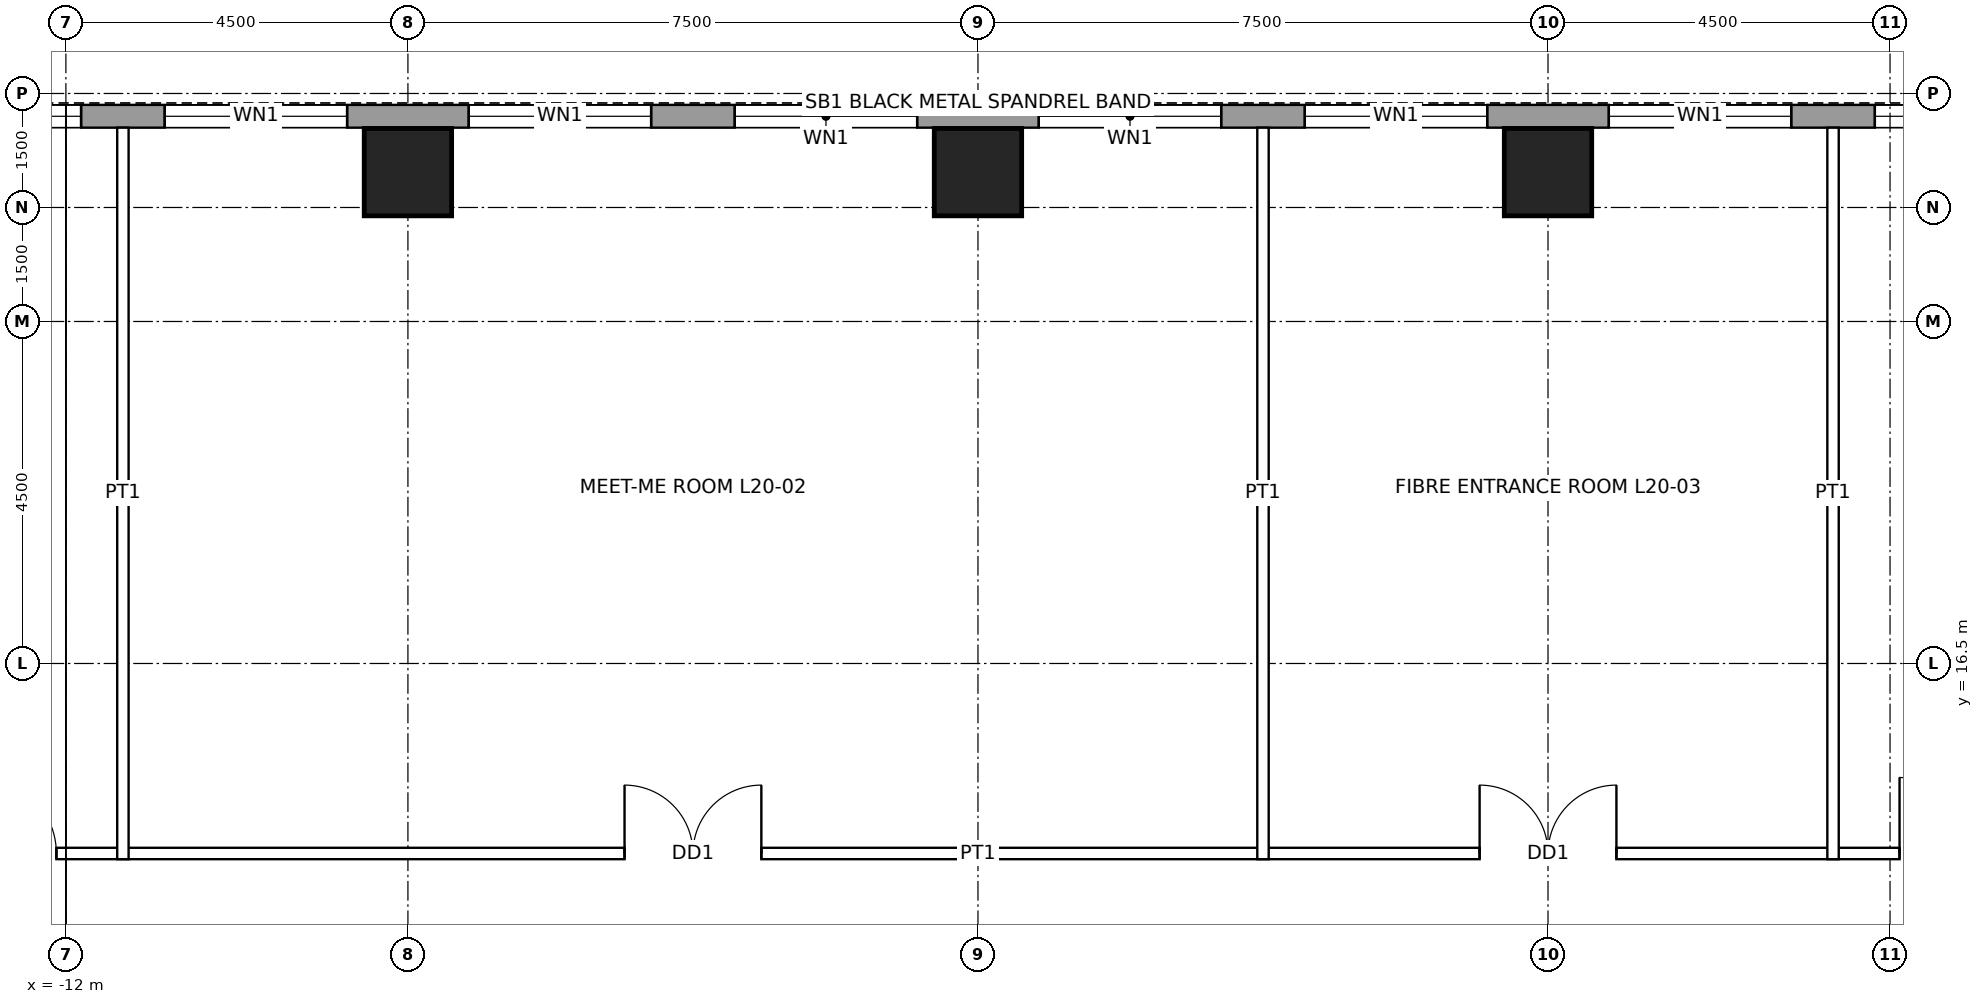
"""IFC4 building model, lengths in metres.
Left out: names, types, materials, properties, quantities, classifications, styles, units other than length and angle.
Written with IfcOpenShell. Run it as: python <this file> out.ifc"""

import sys

from ifc_helpers import new_model, si_unit, direction, frame, frame_2d, origin, origin_2d, place, context, subcontext, project, spatial, rectangle, hollow_rectangle, extrude, element, fill, save


model = new_model("IFC4")
c1 = context("Model", 3, precision=1e-05, world=origin(), true_north=direction((0.0, 1.0)))
c2 = subcontext(c1, "Body", "Model", "MODEL_VIEW")
j1 = project(units=[si_unit("LENGTHUNIT", "METRE"), si_unit("PLANEANGLEUNIT", "RADIAN")], contexts=[c1])
p1 = place(None, origin())
s1 = spatial("IfcSite", under=j1, at=p1, CompositionType="ELEMENT")
p2 = place(p1, origin())
s2 = spatial("IfcBuilding", under=s1, at=p2, CompositionType="ELEMENT")
p3 = place(p2, frame((0.0, 0.0, 104.4)))
s3 = spatial("IfcBuildingStorey", under=s2, at=p3, CompositionType="ELEMENT", Elevation=104.4)
for number, where, z_axis, x_axis in (
    (1, (-7.5, 22.965, 0.0), (0.0, 0.0, 1.0), (1.0, 0.0, 0.0)),
    (2, (0.0, 22.965, 0.0), (0.0, 0.0, 1.0), (1.0, 0.0, 0.0)),
    (3, (7.5, 22.965, 0.0), (0.0, 0.0, 1.0), (1.0, 0.0, 0.0)),
):
    element("IfcColumn", number, at=place(p3, frame(where, z_axis=z_axis, x_axis=x_axis)), inside=s3, PredefinedType="COLUMN", context=c2, shape_type="SweptSolid", body=[
        extrude(hollow_rectangle(XDim=1.15, YDim=1.15, WallThickness=0.075, at=origin_2d()), origin(), (0.0, 0.0, 1.0), 4.5),
    ])
p4 = place(p3, frame((-16.2, 23.7, 0.0), z_axis=(0.0, 0.0, 1.0), x_axis=(1.0, 0.0, 0.0)))
e4 = element("IfcWall", 4, at=p4, inside=s3, PredefinedType="SOLIDWALL", context=c2, shape_type="SweptSolid", body=[
    extrude(rectangle(XDim=32.4, YDim=0.3, at=frame_2d((16.2, 0.0))), origin(), (0.0, 0.0, 1.0), 4.3),
])
p5 = place(p4, frame((2.0, 0.0, 1.0)))
e5 = element("IfcOpeningElement", 5, at=p5, cuts=e4, PredefinedType="OPENING", context=c2, shape_type="SweptSolid", body=[
    extrude(rectangle(XDim=2.4, YDim=1.2, at=frame_2d((1.2, 0.6))), frame((0.0, 0.16, 0.0), z_axis=(0.0, -1.0, 0.0), x_axis=(1.0, 0.0, 0.0)), (0.0, 0.0, 1.0), 0.32),
])
p6 = place(p4, frame((5.5, 0.0, 1.0)))
e6 = element("IfcOpeningElement", 6, at=p6, cuts=e4, PredefinedType="OPENING", context=c2, shape_type="SweptSolid", body=[
    extrude(rectangle(XDim=2.4, YDim=1.2, at=frame_2d((1.2, 0.6))), frame((0.0, 0.16, 0.0), z_axis=(0.0, -1.0, 0.0), x_axis=(1.0, 0.0, 0.0)), (0.0, 0.0, 1.0), 0.32),
])
p7 = place(p4, frame((9.5, 0.0, 1.0)))
e7 = element("IfcOpeningElement", 7, at=p7, cuts=e4, PredefinedType="OPENING", context=c2, shape_type="SweptSolid", body=[
    extrude(rectangle(XDim=2.4, YDim=1.2, at=frame_2d((1.2, 0.6))), frame((0.0, 0.16, 0.0), z_axis=(0.0, -1.0, 0.0), x_axis=(1.0, 0.0, 0.0)), (0.0, 0.0, 1.0), 0.32),
])
p8 = place(p4, frame((13.0, 0.0, 1.0)))
e8 = element("IfcOpeningElement", 8, at=p8, cuts=e4, PredefinedType="OPENING", context=c2, shape_type="SweptSolid", body=[
    extrude(rectangle(XDim=2.4, YDim=1.2, at=frame_2d((1.2, 0.6))), frame((0.0, 0.16, 0.0), z_axis=(0.0, -1.0, 0.0), x_axis=(1.0, 0.0, 0.0)), (0.0, 0.0, 1.0), 0.32),
])
p9 = place(p4, frame((17.0, 0.0, 1.0)))
e9 = element("IfcOpeningElement", 9, at=p9, cuts=e4, PredefinedType="OPENING", context=c2, shape_type="SweptSolid", body=[
    extrude(rectangle(XDim=2.4, YDim=1.2, at=frame_2d((1.2, 0.6))), frame((0.0, 0.16, 0.0), z_axis=(0.0, -1.0, 0.0), x_axis=(1.0, 0.0, 0.0)), (0.0, 0.0, 1.0), 0.32),
])
p10 = place(p4, frame((20.5, 0.0, 1.0)))
e10 = element("IfcOpeningElement", 10, at=p10, cuts=e4, PredefinedType="OPENING", context=c2, shape_type="SweptSolid", body=[
    extrude(rectangle(XDim=2.4, YDim=1.2, at=frame_2d((1.2, 0.6))), frame((0.0, 0.16, 0.0), z_axis=(0.0, -1.0, 0.0), x_axis=(1.0, 0.0, 0.0)), (0.0, 0.0, 1.0), 0.32),
])
p11 = place(p4, frame((24.5, 0.0, 1.0)))
e11 = element("IfcOpeningElement", 11, at=p11, cuts=e4, PredefinedType="OPENING", context=c2, shape_type="SweptSolid", body=[
    extrude(rectangle(XDim=2.4, YDim=1.2, at=frame_2d((1.2, 0.6))), frame((0.0, 0.16, 0.0), z_axis=(0.0, -1.0, 0.0), x_axis=(1.0, 0.0, 0.0)), (0.0, 0.0, 1.0), 0.32),
])
p12 = place(p4, frame((28.0, 0.0, 1.0)))
e12 = element("IfcOpeningElement", 12, at=p12, cuts=e4, PredefinedType="OPENING", context=c2, shape_type="SweptSolid", body=[
    extrude(rectangle(XDim=2.4, YDim=1.2, at=frame_2d((1.2, 0.6))), frame((0.0, 0.16, 0.0), z_axis=(0.0, -1.0, 0.0), x_axis=(1.0, 0.0, 0.0)), (0.0, 0.0, 1.0), 0.32),
])
p13 = place(p3, frame((-14.075, 14.0, 0.0), z_axis=(0.0, 0.0, 1.0), x_axis=(1.0, 0.0, 0.0)))
e13 = element("IfcWall", 13, at=p13, inside=s3, PredefinedType="PARTITIONING", context=c2, shape_type="SweptSolid", body=[
    extrude(rectangle(XDim=28.15, YDim=0.15, at=frame_2d((14.075, 0.0))), origin(), (0.0, 0.0, 1.0), 4.3),
])
p14 = place(p13, frame((9.425, 0.0, 0.0)))
e14 = element("IfcOpeningElement", 14, at=p14, cuts=e13, PredefinedType="OPENING", context=c2, shape_type="SweptSolid", body=[
    extrude(rectangle(XDim=1.8, YDim=2.4, at=frame_2d((0.9, 1.2))), frame((0.0, 0.085, 0.0), z_axis=(0.0, -1.0, 0.0), x_axis=(1.0, 0.0, 0.0)), (0.0, 0.0, 1.0), 0.17),
])
p15 = place(p13, frame((20.675, 0.0, 0.0)))
e15 = element("IfcOpeningElement", 15, at=p15, cuts=e13, PredefinedType="OPENING", context=c2, shape_type="SweptSolid", body=[
    extrude(rectangle(XDim=1.8, YDim=2.4, at=frame_2d((0.9, 1.2))), frame((0.0, 0.085, 0.0), z_axis=(0.0, -1.0, 0.0), x_axis=(1.0, 0.0, 0.0)), (0.0, 0.0, 1.0), 0.17),
])
p16 = place(p13, frame((26.2, 0.0, 0.0)))
e16 = element("IfcOpeningElement", 16, at=p16, cuts=e13, PredefinedType="OPENING", context=c2, shape_type="SweptSolid", body=[
    extrude(rectangle(XDim=1.0, YDim=2.1, at=frame_2d((0.5, 1.05))), frame((0.0, 0.085, 0.0), z_axis=(0.0, -1.0, 0.0), x_axis=(1.0, 0.0, 0.0)), (0.0, 0.0, 1.0), 0.17),
])
p17 = place(p13, frame((0.95, 0.0, 0.0)))
e17 = element("IfcOpeningElement", 17, at=p17, cuts=e13, PredefinedType="OPENING", context=c2, shape_type="SweptSolid", body=[
    extrude(rectangle(XDim=1.0, YDim=2.1, at=frame_2d((0.5, 1.05))), frame((0.0, 0.085, 0.0), z_axis=(0.0, -1.0, 0.0), x_axis=(1.0, 0.0, 0.0)), (0.0, 0.0, 1.0), 0.17),
])
for number, where, z_axis, x_axis in (
    (18, (-11.25, 13.925, 0.0), (0.0, 0.0, 1.0), (0.0, 1.0, 0.0)),
    (19, (3.75, 13.925, 0.0), (0.0, 0.0, 1.0), (0.0, 1.0, 0.0)),
    (20, (11.25, 13.925, 0.0), (0.0, 0.0, 1.0), (0.0, 1.0, 0.0)),
):
    element("IfcWall", number, at=place(p3, frame(where, z_axis=z_axis, x_axis=x_axis)), inside=s3, PredefinedType="PARTITIONING", context=c2, shape_type="SweptSolid", body=[
        extrude(rectangle(XDim=9.625, YDim=0.15, at=frame_2d((4.812, 0.0))), origin(), (0.0, 0.0, 1.0), 3.431),
    ])
p18 = place(p5, origin())
e21 = element("IfcWindow", 21, at=p18, inside=s3, PartitioningType="SINGLE_PANEL", PredefinedType="WINDOW", context=c2, shape_type="SweptSolid", body=[
    extrude(rectangle(XDim=2.4, YDim=1.2, at=frame_2d((1.2, 0.6))), frame((0.0, 0.03, 0.0), z_axis=(0.0, -1.0, 0.0), x_axis=(1.0, 0.0, 0.0)), (0.0, 0.0, 1.0), 0.06),
])
fill(e5, e21)
p19 = place(p6, origin())
e22 = element("IfcWindow", 22, at=p19, inside=s3, PartitioningType="SINGLE_PANEL", PredefinedType="WINDOW", context=c2, shape_type="SweptSolid", body=[
    extrude(rectangle(XDim=2.4, YDim=1.2, at=frame_2d((1.2, 0.6))), frame((0.0, 0.03, 0.0), z_axis=(0.0, -1.0, 0.0), x_axis=(1.0, 0.0, 0.0)), (0.0, 0.0, 1.0), 0.06),
])
fill(e6, e22)
p20 = place(p7, origin())
e23 = element("IfcWindow", 23, at=p20, inside=s3, PartitioningType="SINGLE_PANEL", PredefinedType="WINDOW", context=c2, shape_type="SweptSolid", body=[
    extrude(rectangle(XDim=2.4, YDim=1.2, at=frame_2d((1.2, 0.6))), frame((0.0, 0.03, 0.0), z_axis=(0.0, -1.0, 0.0), x_axis=(1.0, 0.0, 0.0)), (0.0, 0.0, 1.0), 0.06),
])
fill(e7, e23)
p21 = place(p8, origin())
e24 = element("IfcWindow", 24, at=p21, inside=s3, PartitioningType="SINGLE_PANEL", PredefinedType="WINDOW", context=c2, shape_type="SweptSolid", body=[
    extrude(rectangle(XDim=2.4, YDim=1.2, at=frame_2d((1.2, 0.6))), frame((0.0, 0.03, 0.0), z_axis=(0.0, -1.0, 0.0), x_axis=(1.0, 0.0, 0.0)), (0.0, 0.0, 1.0), 0.06),
])
fill(e8, e24)
p22 = place(p9, origin())
e25 = element("IfcWindow", 25, at=p22, inside=s3, PartitioningType="SINGLE_PANEL", PredefinedType="WINDOW", context=c2, shape_type="SweptSolid", body=[
    extrude(rectangle(XDim=2.4, YDim=1.2, at=frame_2d((1.2, 0.6))), frame((0.0, 0.03, 0.0), z_axis=(0.0, -1.0, 0.0), x_axis=(1.0, 0.0, 0.0)), (0.0, 0.0, 1.0), 0.06),
])
fill(e9, e25)
p23 = place(p10, origin())
e26 = element("IfcWindow", 26, at=p23, inside=s3, PartitioningType="SINGLE_PANEL", PredefinedType="WINDOW", context=c2, shape_type="SweptSolid", body=[
    extrude(rectangle(XDim=2.4, YDim=1.2, at=frame_2d((1.2, 0.6))), frame((0.0, 0.03, 0.0), z_axis=(0.0, -1.0, 0.0), x_axis=(1.0, 0.0, 0.0)), (0.0, 0.0, 1.0), 0.06),
])
fill(e10, e26)
p24 = place(p11, origin())
e27 = element("IfcWindow", 27, at=p24, inside=s3, PartitioningType="SINGLE_PANEL", PredefinedType="WINDOW", context=c2, shape_type="SweptSolid", body=[
    extrude(rectangle(XDim=2.4, YDim=1.2, at=frame_2d((1.2, 0.6))), frame((0.0, 0.03, 0.0), z_axis=(0.0, -1.0, 0.0), x_axis=(1.0, 0.0, 0.0)), (0.0, 0.0, 1.0), 0.06),
])
fill(e11, e27)
p25 = place(p12, origin())
e28 = element("IfcWindow", 28, at=p25, inside=s3, PartitioningType="SINGLE_PANEL", PredefinedType="WINDOW", context=c2, shape_type="SweptSolid", body=[
    extrude(rectangle(XDim=2.4, YDim=1.2, at=frame_2d((1.2, 0.6))), frame((0.0, 0.03, 0.0), z_axis=(0.0, -1.0, 0.0), x_axis=(1.0, 0.0, 0.0)), (0.0, 0.0, 1.0), 0.06),
])
fill(e12, e28)
p26 = place(p14, origin())
e29 = element("IfcDoor", 29, at=p26, inside=s3, OperationType="DOUBLE_DOOR_SINGLE_SWING", PredefinedType="DOOR", context=c2, shape_type="SweptSolid", body=[
    extrude(rectangle(XDim=1.8, YDim=2.4, at=frame_2d((0.9, 1.2))), frame((0.0, 0.025, 0.0), z_axis=(0.0, -1.0, 0.0), x_axis=(1.0, 0.0, 0.0)), (0.0, 0.0, 1.0), 0.05),
])
fill(e14, e29)
p27 = place(p15, origin())
e30 = element("IfcDoor", 30, at=p27, inside=s3, OperationType="DOUBLE_DOOR_SINGLE_SWING", PredefinedType="DOOR", context=c2, shape_type="SweptSolid", body=[
    extrude(rectangle(XDim=1.8, YDim=2.4, at=frame_2d((0.9, 1.2))), frame((0.0, 0.025, 0.0), z_axis=(0.0, -1.0, 0.0), x_axis=(1.0, 0.0, 0.0)), (0.0, 0.0, 1.0), 0.05),
])
fill(e15, e30)
p28 = place(p16, origin())
e31 = element("IfcDoor", 31, at=p28, inside=s3, OperationType="SINGLE_SWING_LEFT", PredefinedType="DOOR", context=c2, shape_type="SweptSolid", body=[
    extrude(rectangle(XDim=1.0, YDim=2.1, at=frame_2d((0.5, 1.05))), frame((0.0, 0.025, 0.0), z_axis=(0.0, -1.0, 0.0), x_axis=(1.0, 0.0, 0.0)), (0.0, 0.0, 1.0), 0.05),
])
fill(e16, e31)
p29 = place(p17, origin())
e32 = element("IfcDoor", 32, at=p29, inside=s3, OperationType="SINGLE_SWING_LEFT", PredefinedType="DOOR", context=c2, shape_type="SweptSolid", body=[
    extrude(rectangle(XDim=1.0, YDim=2.1, at=frame_2d((0.5, 1.05))), frame((0.0, 0.025, 0.0), z_axis=(0.0, -1.0, 0.0), x_axis=(1.0, 0.0, 0.0)), (0.0, 0.0, 1.0), 0.05),
])
fill(e17, e32)
save(model, sys.argv[1])
